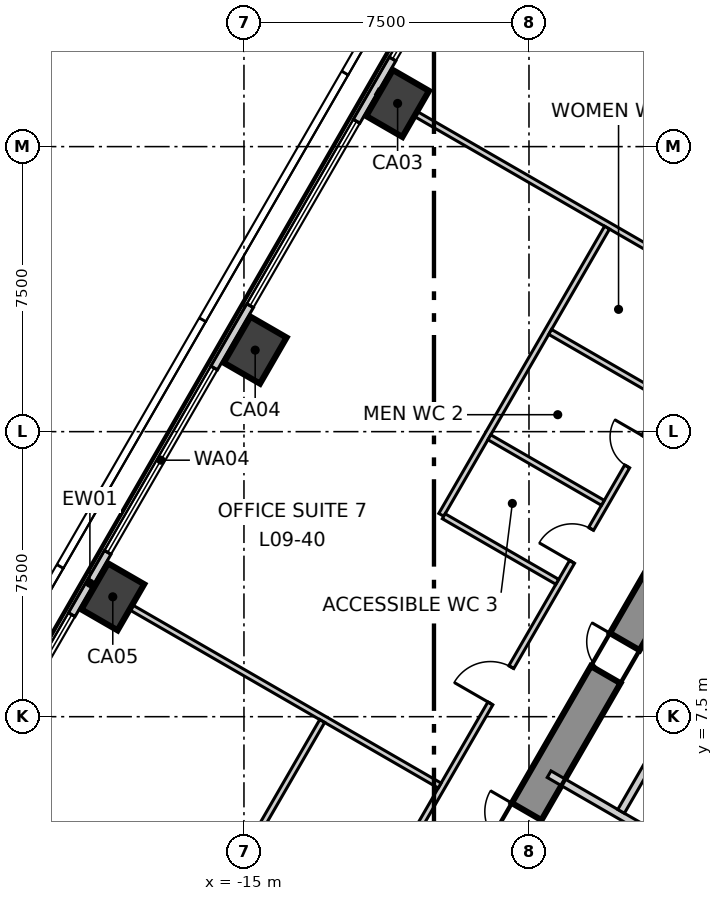
"""IFC4 building model, lengths in metres.
Left out: names, types, materials, properties, quantities, classifications, styles, units other than length and angle.
Written with IfcOpenShell. Run it as: python <this file> out.ifc"""

import sys

from ifc_helpers import new_model, si_unit, direction, frame, frame_2d, origin, origin_2d, place, context, subcontext, project, spatial, polyline, rectangle, outline, extrude, element, fill, save


model = new_model("IFC4")
c1 = context("Model", 3, precision=1e-05, world=origin(), true_north=direction((0.0, 1.0)))
c2 = subcontext(c1, "Body", "Model", "MODEL_VIEW")
j1 = project(units=[si_unit("LENGTHUNIT", "METRE"), si_unit("PLANEANGLEUNIT", "RADIAN")], contexts=[c1])
p1 = place(None, origin())
s1 = spatial("IfcSite", under=j1, at=p1, CompositionType="ELEMENT")
p2 = place(p1, origin())
s2 = spatial("IfcBuilding", under=s1, at=p2, CompositionType="ELEMENT")
p3 = place(p2, frame((0.0, 0.0, 47.3)))
s3 = spatial("IfcBuildingStorey", under=s2, at=p3, CompositionType="ELEMENT", Elevation=47.3)
p4 = place(p3, frame((-1.645, 15.25, -0.3), z_axis=(0.0, 0.0, 1.0), x_axis=(-0.500026485275, -0.866010111964, 0.0)))
e1 = element("IfcWall", 1, at=p4, inside=s3, PredefinedType="SHEAR", context=c2, shape_type="SweptSolid", body=[
    extrude(outline(polyline([(-0.26, -0.45), (1.685, -0.45), (3.63, -0.45), (5.576, -0.45), (7.521, -0.45), (9.466, -0.449), (11.411, -0.449), (13.357, -0.449), (15.302, -0.449), (17.247, -0.449), (19.192, -0.449), (21.138, -0.449), (23.083, -0.449), (25.028, -0.449), (24.509, 0.45), (22.644, 0.45), (20.778, 0.45), (18.913, 0.45), (17.048, 0.45), (15.182, 0.449), (13.317, 0.449), (11.452, 0.449), (9.587, 0.449), (7.721, 0.449), (5.856, 0.449), (3.991, 0.449), (2.125, 0.449), (0.26, 0.449), (-0.26, -0.45)])), origin(), (0.0, 0.0, 1.0), 4.0),
])
p5 = place(p4, frame((11.834, 0.0, 0.3)))
e2 = element("IfcOpeningElement", 2, at=p5, cuts=e1, PredefinedType="OPENING", context=c2, shape_type="SweptSolid", body=[
    extrude(rectangle(XDim=1.1, YDim=2.1, at=frame_2d((0.55, 1.05))), frame((0.0, 0.46, 0.0), z_axis=(0.0, -1.0, 0.0), x_axis=(1.0, 0.0, 0.0)), (0.0, 0.0, 1.0), 0.92),
])
p6 = place(p4, frame((6.671, 0.0, 0.3)))
e3 = element("IfcOpeningElement", 3, at=p6, cuts=e1, PredefinedType="OPENING", context=c2, shape_type="SweptSolid", body=[
    extrude(rectangle(XDim=1.0, YDim=2.1, at=frame_2d((0.5, 1.05))), frame((0.0, 0.46, 0.0), z_axis=(0.0, -1.0, 0.0), x_axis=(1.0, 0.0, 0.0)), (0.0, 0.0, 1.0), 0.92),
])
for number, where, z_axis, x_axis in (
    (4, (-10.957, 23.636, -0.3), (0.0, 0.0, 1.0), (0.5, 0.866, 0.0)),
    (5, (-14.705, 17.145, -0.3), (0.0, 0.0, 1.0), (0.5, 0.866, 0.0)),
    (6, (-18.452, 10.654, -0.3), (0.0, 0.0, 1.0), (0.5, 0.866, 0.0)),
):
    element("IfcColumn", number, at=place(p3, frame(where, z_axis=z_axis, x_axis=x_axis)), inside=s3, PredefinedType="COLUMN", context=c2, shape_type="SweptSolid", body=[
        extrude(rectangle(XDim=1.4, YDim=1.1, at=origin_2d()), origin(), (0.0, 0.0, 1.0), 4.0),
    ])
p7 = place(p3, frame((-3.417, 38.096, 0.0), z_axis=(0.0, 0.0, 1.0), x_axis=(-0.500000412988, -0.866025165346, 0.0)))
e7 = element("IfcWall", 7, at=p7, inside=s3, PredefinedType="ELEMENTEDWALL", context=c2, shape_type="SweptSolid", body=[
    extrude(rectangle(XDim=62.548, YDim=0.2, at=frame_2d((31.274, 0.0))), origin(), (0.0, 0.0, 1.0), 3.7),
])
p8 = place(p7, frame((2.25, 0.0, 0.9)))
e8 = element("IfcOpeningElement", 8, at=p8, cuts=e7, PredefinedType="OPENING", context=c2, shape_type="SweptSolid", body=[
    extrude(rectangle(XDim=5.6, YDim=2.5, at=frame_2d((2.8, 1.25))), frame((0.0, 0.11, 0.0), z_axis=(0.0, -1.0, 0.0), x_axis=(1.0, 0.0, 0.0)), (0.0, 0.0, 1.0), 0.22),
])
p9 = place(p7, frame((9.745, 0.0, 0.9)))
e9 = element("IfcOpeningElement", 9, at=p9, cuts=e7, PredefinedType="OPENING", context=c2, shape_type="SweptSolid", body=[
    extrude(rectangle(XDim=5.6, YDim=2.5, at=frame_2d((2.8, 1.25))), frame((0.0, 0.11, 0.0), z_axis=(0.0, -1.0, 0.0), x_axis=(1.0, 0.0, 0.0)), (0.0, 0.0, 1.0), 0.22),
])
p10 = place(p7, frame((17.241, 0.0, 0.9)))
e10 = element("IfcOpeningElement", 10, at=p10, cuts=e7, PredefinedType="OPENING", context=c2, shape_type="SweptSolid", body=[
    extrude(rectangle(XDim=5.6, YDim=2.5, at=frame_2d((2.8, 1.25))), frame((0.0, 0.11, 0.0), z_axis=(0.0, -1.0, 0.0), x_axis=(1.0, 0.0, 0.0)), (0.0, 0.0, 1.0), 0.22),
])
p11 = place(p7, frame((24.736, 0.0, 0.9)))
e11 = element("IfcOpeningElement", 11, at=p11, cuts=e7, PredefinedType="OPENING", context=c2, shape_type="SweptSolid", body=[
    extrude(rectangle(XDim=5.6, YDim=2.5, at=frame_2d((2.8, 1.25))), frame((0.0, 0.11, 0.0), z_axis=(0.0, -1.0, 0.0), x_axis=(1.0, 0.0, 0.0)), (0.0, 0.0, 1.0), 0.22),
])
p12 = place(p7, frame((32.231, 0.0, 0.9)))
e12 = element("IfcOpeningElement", 12, at=p12, cuts=e7, PredefinedType="OPENING", context=c2, shape_type="SweptSolid", body=[
    extrude(rectangle(XDim=5.6, YDim=2.5, at=frame_2d((2.8, 1.25))), frame((0.0, 0.11, 0.0), z_axis=(0.0, -1.0, 0.0), x_axis=(1.0, 0.0, 0.0)), (0.0, 0.0, 1.0), 0.22),
])
p13 = place(p7, frame((39.727, 0.0, 0.9)))
e13 = element("IfcOpeningElement", 13, at=p13, cuts=e7, PredefinedType="OPENING", context=c2, shape_type="SweptSolid", body=[
    extrude(rectangle(XDim=5.6, YDim=2.5, at=frame_2d((2.8, 1.25))), frame((0.0, 0.11, 0.0), z_axis=(0.0, -1.0, 0.0), x_axis=(1.0, 0.0, 0.0)), (0.0, 0.0, 1.0), 0.22),
])
p14 = place(p7, frame((47.222, 0.0, 0.9)))
e14 = element("IfcOpeningElement", 14, at=p14, cuts=e7, PredefinedType="OPENING", context=c2, shape_type="SweptSolid", body=[
    extrude(rectangle(XDim=5.6, YDim=2.5, at=frame_2d((2.8, 1.25))), frame((0.0, 0.11, 0.0), z_axis=(0.0, -1.0, 0.0), x_axis=(1.0, 0.0, 0.0)), (0.0, 0.0, 1.0), 0.22),
])
p15 = place(p7, frame((54.717, 0.0, 0.9)))
e15 = element("IfcOpeningElement", 15, at=p15, cuts=e7, PredefinedType="OPENING", context=c2, shape_type="SweptSolid", body=[
    extrude(rectangle(XDim=5.6, YDim=2.5, at=frame_2d((2.8, 1.25))), frame((0.0, 0.11, 0.0), z_axis=(0.0, -1.0, 0.0), x_axis=(1.0, 0.0, 0.0)), (0.0, 0.0, 1.0), 0.22),
])
p16 = place(p3, frame((-19.497, -11.17, 0.0), z_axis=(0.0, 0.0, 1.0), x_axis=(0.499998854553, 0.866026065108, 0.0)))
e16 = element("IfcWall", 16, at=p16, inside=s3, PredefinedType="PARTITIONING", context=c2, shape_type="SweptSolid", body=[
    extrude(rectangle(XDim=38.994, YDim=0.15, at=frame_2d((19.497, 0.0))), origin(), (0.0, 0.0, 1.0), 3.7),
])
p17 = place(p16, frame((36.144, 0.0, 0.0)))
e17 = element("IfcOpeningElement", 17, at=p17, cuts=e16, PredefinedType="OPENING", context=c2, shape_type="SweptSolid", body=[
    extrude(rectangle(XDim=1.1, YDim=2.1, at=frame_2d((0.55, 1.05))), frame((0.0, 0.085, 0.0), z_axis=(0.0, -1.0, 0.0), x_axis=(1.0, 0.0, 0.0)), (0.0, 0.0, 1.0), 0.17),
])
p18 = place(p16, frame((21.963, 0.0, 0.0)))
e18 = element("IfcOpeningElement", 18, at=p18, cuts=e16, PredefinedType="OPENING", context=c2, shape_type="SweptSolid", body=[
    extrude(rectangle(XDim=1.1, YDim=2.1, at=frame_2d((0.55, 1.05))), frame((0.0, 0.085, 0.0), z_axis=(0.0, -1.0, 0.0), x_axis=(1.0, 0.0, 0.0)), (0.0, 0.0, 1.0), 0.17),
])
p19 = place(p16, frame((32.363, 0.0, 0.0)))
e19 = element("IfcOpeningElement", 19, at=p19, cuts=e16, PredefinedType="OPENING", context=c2, shape_type="SweptSolid", body=[
    extrude(rectangle(XDim=0.9, YDim=2.1, at=frame_2d((0.45, 1.05))), frame((0.0, 0.085, 0.0), z_axis=(0.0, -1.0, 0.0), x_axis=(1.0, 0.0, 0.0)), (0.0, 0.0, 1.0), 0.17),
])
p20 = place(p16, frame((29.163, 0.0, 0.0)))
e20 = element("IfcOpeningElement", 20, at=p20, cuts=e16, PredefinedType="OPENING", context=c2, shape_type="SweptSolid", body=[
    extrude(rectangle(XDim=0.9, YDim=2.1, at=frame_2d((0.45, 1.05))), frame((0.0, 0.085, 0.0), z_axis=(0.0, -1.0, 0.0), x_axis=(1.0, 0.0, 0.0)), (0.0, 0.0, 1.0), 0.17),
])
p21 = place(p16, frame((26.263, 0.0, 0.0)))
e21 = element("IfcOpeningElement", 21, at=p21, cuts=e16, PredefinedType="OPENING", context=c2, shape_type="SweptSolid", body=[
    extrude(rectangle(XDim=1.0, YDim=2.1, at=frame_2d((0.5, 1.05))), frame((0.0, 0.085, 0.0), z_axis=(0.0, -1.0, 0.0), x_axis=(1.0, 0.0, 0.0)), (0.0, 0.0, 1.0), 0.17),
])
p22 = place(p16, frame((11.373, 0.0, 0.0)))
e22 = element("IfcOpeningElement", 22, at=p22, cuts=e16, PredefinedType="OPENING", context=c2, shape_type="SweptSolid", body=[
    extrude(rectangle(XDim=1.1, YDim=2.1, at=frame_2d((0.55, 1.05))), frame((0.0, 0.085, 0.0), z_axis=(0.0, -1.0, 0.0), x_axis=(1.0, 0.0, 0.0)), (0.0, 0.0, 1.0), 0.17),
])
p23 = place(p16, frame((1.581, 0.0, 0.0)))
e23 = element("IfcOpeningElement", 23, at=p23, cuts=e16, PredefinedType="OPENING", context=c2, shape_type="SweptSolid", body=[
    extrude(rectangle(XDim=1.1, YDim=2.1, at=frame_2d((0.55, 1.05))), frame((0.0, 0.085, 0.0), z_axis=(0.0, -1.0, 0.0), x_axis=(1.0, 0.0, 0.0)), (0.0, 0.0, 1.0), 0.17),
])
p24 = place(p3, frame((-18.989, 10.964, 0.0), z_axis=(0.0, 0.0, 1.0), x_axis=(0.866011810196, -0.500023544047, 0.0)))
e24 = element("IfcWall", 24, at=p24, inside=s3, PredefinedType="PARTITIONING", context=c2, shape_type="SweptSolid", body=[
    extrude(rectangle(XDim=10.552, YDim=0.15, at=frame_2d((5.276, 0.0))), origin(), (0.0, 0.0, 1.0), 3.2),
])
p25 = place(p3, frame((-11.494, 23.946, 0.0), z_axis=(0.0, 0.0, 1.0), x_axis=(0.866011810196, -0.500023544047, 0.0)))
e25 = element("IfcWall", 25, at=p25, inside=s3, PredefinedType="PARTITIONING", context=c2, shape_type="SweptSolid", body=[
    extrude(rectangle(XDim=10.552, YDim=0.15, at=frame_2d((5.276, 0.0))), origin(), (0.0, 0.0, 1.0), 3.7),
])
p26 = place(p3, frame((-9.808, 12.811, 0.0), z_axis=(0.0, 0.0, 1.0), x_axis=(0.49992187278, 0.866070505857, 0.0)))
e26 = element("IfcWall", 26, at=p26, inside=s3, PredefinedType="PARTITIONING", context=c2, shape_type="SweptSolid", body=[
    extrude(rectangle(XDim=8.726, YDim=0.15, at=frame_2d((4.363, 0.0))), origin(), (0.0, 0.0, 1.0), 3.7),
])
p27 = place(p3, frame((-9.743, 12.774, 0.0), z_axis=(0.0, 0.0, 1.0), x_axis=(0.865973391227, -0.500090077572, 0.0)))
e27 = element("IfcWall", 27, at=p27, inside=s3, PredefinedType="PARTITIONING", context=c2, shape_type="SweptSolid", body=[
    extrude(rectangle(XDim=3.449, YDim=0.15, at=frame_2d((1.725, 0.0))), origin(), (0.0, 0.0, 1.0), 3.7),
])
for number, where, z_axis, x_axis in (
    (28, (-8.543, 14.852, 0.0), (0.0, 0.0, 1.0), (0.866, -0.5, 0.0)),
    (29, (-6.943, 17.624, 0.0), (0.0, 0.0, 1.0), (0.866, -0.5, 0.0)),
):
    element("IfcWall", number, at=place(p3, frame(where, z_axis=z_axis, x_axis=x_axis)), inside=s3, PredefinedType="PARTITIONING", context=c2, shape_type="SweptSolid", body=[
        extrude(rectangle(XDim=3.449, YDim=0.15, at=frame_2d((1.725, 0.0))), origin(), (0.0, 0.0, 1.0), 3.7),
    ])
p28 = place(p3, frame((-20.362, -5.468, 0.0), z_axis=(0.0, 0.0, 1.0), x_axis=(0.49999393442, 0.866028905721, 0.0)))
e30 = element("IfcWall", 30, at=p28, inside=s3, PredefinedType="PARTITIONING", context=c2, shape_type="SweptSolid", body=[
    extrude(rectangle(XDim=14.843, YDim=0.15, at=frame_2d((7.421, 0.0))), origin(), (0.0, 0.0, 1.0), 3.7),
])
p29 = place(p28, frame((6.967, 0.0, 0.0)))
e31 = element("IfcOpeningElement", 31, at=p29, cuts=e30, PredefinedType="OPENING", context=c2, shape_type="SweptSolid", body=[
    extrude(rectangle(XDim=1.0, YDim=2.1, at=frame_2d((0.5, 1.05))), frame((0.0, 0.085, 0.0), z_axis=(0.0, -1.0, 0.0), x_axis=(1.0, 0.0, 0.0)), (0.0, 0.0, 1.0), 0.17),
])
p30 = place(p3, frame((-6.97, 5.987, 0.0), z_axis=(0.0, 0.0, 1.0), x_axis=(0.866029956157, -0.499992114976, 0.0)))
e32 = element("IfcWall", 32, at=p30, inside=s3, PredefinedType="SOLIDWALL", context=c2, shape_type="SweptSolid", body=[
    extrude(rectangle(XDim=4.232, YDim=0.2, at=frame_2d((2.116, 0.0))), origin(), (0.0, 0.0, 1.0), 3.7),
])
p31 = place(p30, frame((2.73, 0.0, 0.0)))
e33 = element("IfcOpeningElement", 33, at=p31, cuts=e32, PredefinedType="OPENING", context=c2, shape_type="SweptSolid", body=[
    extrude(rectangle(XDim=0.9, YDim=2.1, at=frame_2d((0.45, 1.05))), frame((0.0, 0.11, 0.0), z_axis=(0.0, -1.0, 0.0), x_axis=(1.0, 0.0, 0.0)), (0.0, 0.0, 1.0), 0.22),
])
p32 = place(p3, frame((-5.076, 5.009, 0.0), z_axis=(0.0, 0.0, 1.0), x_axis=(0.50002537861, 0.866010750942, 0.0)))
e34 = element("IfcWall", 34, at=p32, inside=s3, PredefinedType="SOLIDWALL", context=c2, shape_type="SweptSolid", body=[
    extrude(rectangle(XDim=3.0, YDim=0.2, at=frame_2d((1.5, 0.0))), origin(), (0.0, 0.0, 1.0), 3.7),
])
p33 = place(p9, origin())
e35 = element("IfcWindow", 35, at=p33, inside=s3, PartitioningType="SINGLE_PANEL", PredefinedType="WINDOW", context=c2, shape_type="SweptSolid", body=[
    extrude(rectangle(XDim=5.6, YDim=2.5, at=frame_2d((2.8, 1.25))), frame((0.0, 0.03, 0.0), z_axis=(0.0, -1.0, 0.0), x_axis=(1.0, 0.0, 0.0)), (0.0, 0.0, 1.0), 0.06),
])
fill(e9, e35)
p34 = place(p10, origin())
e36 = element("IfcWindow", 36, at=p34, inside=s3, PartitioningType="SINGLE_PANEL", PredefinedType="WINDOW", context=c2, shape_type="SweptSolid", body=[
    extrude(rectangle(XDim=5.6, YDim=2.5, at=frame_2d((2.8, 1.25))), frame((0.0, 0.03, 0.0), z_axis=(0.0, -1.0, 0.0), x_axis=(1.0, 0.0, 0.0)), (0.0, 0.0, 1.0), 0.06),
])
fill(e10, e36)
p35 = place(p11, origin())
e37 = element("IfcWindow", 37, at=p35, inside=s3, PartitioningType="SINGLE_PANEL", PredefinedType="WINDOW", context=c2, shape_type="SweptSolid", body=[
    extrude(rectangle(XDim=5.6, YDim=2.5, at=frame_2d((2.8, 1.25))), frame((0.0, 0.03, 0.0), z_axis=(0.0, -1.0, 0.0), x_axis=(1.0, 0.0, 0.0)), (0.0, 0.0, 1.0), 0.06),
])
fill(e11, e37)
p36 = place(p12, origin())
e38 = element("IfcWindow", 38, at=p36, inside=s3, PartitioningType="SINGLE_PANEL", PredefinedType="WINDOW", context=c2, shape_type="SweptSolid", body=[
    extrude(rectangle(XDim=5.6, YDim=2.5, at=frame_2d((2.8, 1.25))), frame((0.0, 0.03, 0.0), z_axis=(0.0, -1.0, 0.0), x_axis=(1.0, 0.0, 0.0)), (0.0, 0.0, 1.0), 0.06),
])
fill(e12, e38)
p37 = place(p18, origin())
e39 = element("IfcDoor", 39, at=p37, inside=s3, OperationType="SINGLE_SWING_RIGHT", PredefinedType="DOOR", context=c2, shape_type="SweptSolid", body=[
    extrude(rectangle(XDim=1.1, YDim=2.1, at=frame_2d((0.55, 1.05))), frame((0.0, 0.025, 0.0), z_axis=(0.0, -1.0, 0.0), x_axis=(1.0, 0.0, 0.0)), (0.0, 0.0, 1.0), 0.05),
])
fill(e18, e39)
p38 = place(p20, origin())
e40 = element("IfcDoor", 40, at=p38, inside=s3, OperationType="SINGLE_SWING_LEFT", PredefinedType="DOOR", context=c2, shape_type="SweptSolid", body=[
    extrude(rectangle(XDim=0.9, YDim=2.1, at=frame_2d((0.45, 1.05))), frame((0.0, 0.025, 0.0), z_axis=(0.0, -1.0, 0.0), x_axis=(1.0, 0.0, 0.0)), (0.0, 0.0, 1.0), 0.05),
])
fill(e20, e40)
p39 = place(p21, origin())
e41 = element("IfcDoor", 41, at=p39, inside=s3, OperationType="SINGLE_SWING_RIGHT", PredefinedType="DOOR", context=c2, shape_type="SweptSolid", body=[
    extrude(rectangle(XDim=1.0, YDim=2.1, at=frame_2d((0.5, 1.05))), frame((0.0, 0.025, 0.0), z_axis=(0.0, -1.0, 0.0), x_axis=(1.0, 0.0, 0.0)), (0.0, 0.0, 1.0), 0.05),
])
fill(e21, e41)
p40 = place(p5, origin())
e42 = element("IfcDoor", 42, at=p40, inside=s3, OperationType="SINGLE_SWING_LEFT", PredefinedType="DOOR", context=c2, shape_type="SweptSolid", body=[
    extrude(rectangle(XDim=1.1, YDim=2.1, at=frame_2d((0.55, 1.05))), frame((0.0, 0.025, 0.0), z_axis=(0.0, -1.0, 0.0), x_axis=(1.0, 0.0, 0.0)), (0.0, 0.0, 1.0), 0.05),
])
fill(e2, e42)
p41 = place(p6, origin())
e43 = element("IfcDoor", 43, at=p41, inside=s3, OperationType="SINGLE_SWING_LEFT", PredefinedType="DOOR", context=c2, shape_type="SweptSolid", body=[
    extrude(rectangle(XDim=1.0, YDim=2.1, at=frame_2d((0.5, 1.05))), frame((0.0, 0.025, 0.0), z_axis=(0.0, -1.0, 0.0), x_axis=(1.0, 0.0, 0.0)), (0.0, 0.0, 1.0), 0.05),
])
fill(e3, e43)
save(model, sys.argv[1])
